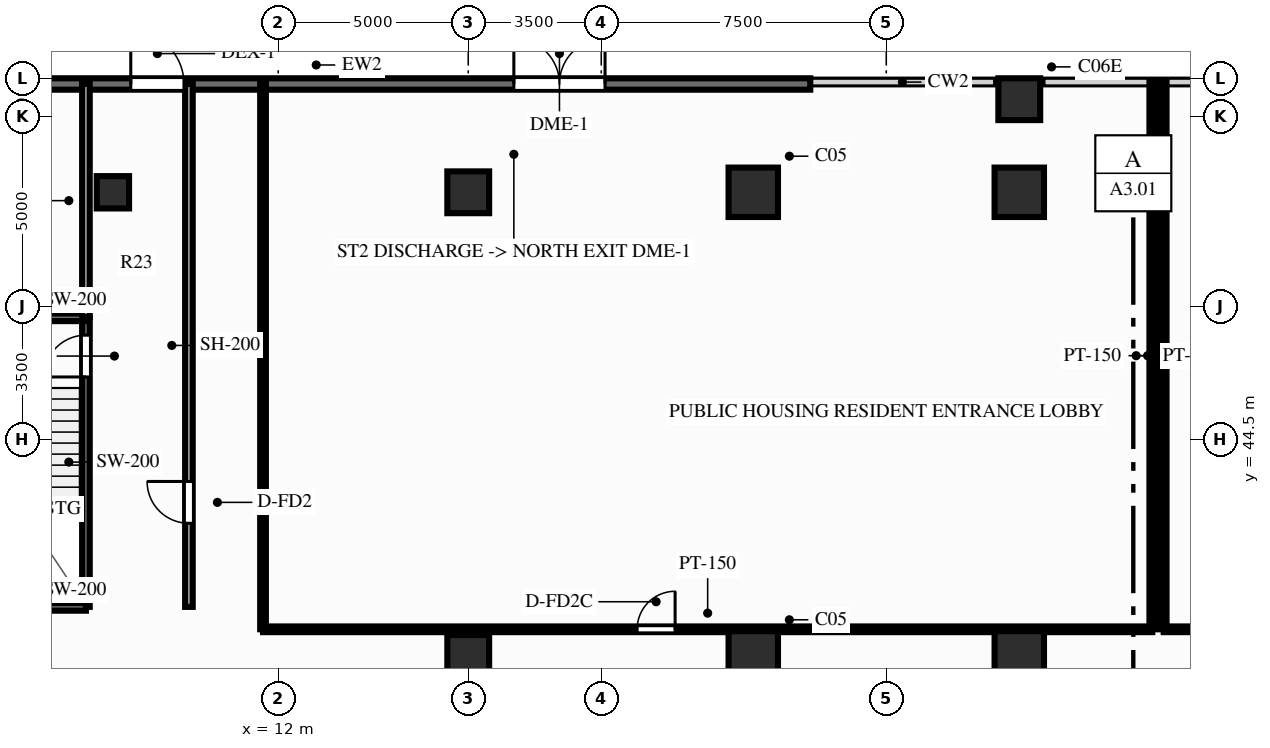
"""IFC4 building model, lengths in metres.
Left out: names, types, materials, properties, quantities, classifications, styles, units other than length and angle.
Written with IfcOpenShell. Run it as: python <this file> out.ifc"""

import sys

from ifc_helpers import new_model, si_unit, direction, frame, frame_2d, origin, origin_2d, place, context, subcontext, project, spatial, rectangle, circle, extrude, source, transform, mapped, element, fill, save


model = new_model("IFC4")
c1 = context("Model", 3, precision=1e-05, world=origin(), true_north=direction((0.0, 1.0)))
c2 = subcontext(c1, "Body", "Model", "MODEL_VIEW")
j1 = project(units=[si_unit("LENGTHUNIT", "METRE"), si_unit("PLANEANGLEUNIT", "RADIAN")], contexts=[c1])
p1 = place(None, origin())
s1 = spatial("IfcSite", under=j1, at=p1, CompositionType="ELEMENT")
p2 = place(p1, origin())
s2 = spatial("IfcBuilding", under=s1, at=p2, CompositionType="ELEMENT")
p3 = place(p2, origin())
s3 = spatial("IfcBuildingStorey", under=s2, at=p3, CompositionType="ELEMENT", Elevation=0.0)
m1 = source(origin(), c2, "Body", "SweptSolid", [
    extrude(circle(Radius=0.425, at=origin_2d()), origin(), (0.0, 0.0, 1.0), 4.2),
])
p4 = place(p3, frame((7.65, 51.0, 0.0), z_axis=(0.0, 0.0, 1.0), x_axis=(1.0, 0.0, 0.0)))
e1 = element("IfcColumn", 1, at=p4, inside=s3, PredefinedType="COLUMN", context=c2, shape_type="MappedRepresentation", body=[
    mapped(m1, transform((0.0, 0.0, 0.0), scale=1.0)),
])
m2 = source(origin(), c2, "Body", "SweptSolid", [
    extrude(rectangle(XDim=1.1, YDim=1.1, at=origin_2d()), origin(), (0.0, 0.0, 1.0), 4.2),
])
for number, where, z_axis, x_axis in (
    (2, (17.0, 38.8, 0.0), (0.0, 0.0, 1.0), (1.0, 0.0, 0.0)),
    (3, (17.0, 51.0, 0.0), (0.0, 0.0, 1.0), (1.0, 0.0, 0.0)),
):
    element("IfcColumn", number, at=place(p3, frame(where, z_axis=z_axis, x_axis=x_axis)), inside=s3, PredefinedType="COLUMN", context=c2, shape_type="MappedRepresentation", body=[
        mapped(m2, transform((0.0, 0.0, 0.0), scale=1.0)),
    ])
m3 = source(origin(), c2, "Body", "SweptSolid", [
    extrude(rectangle(XDim=1.3, YDim=1.3, at=origin_2d()), origin(), (0.0, 0.0, 1.0), 4.2),
])
for number, where, z_axis, x_axis in (
    (4, (24.5, 38.8, 0.0), (0.0, 0.0, 1.0), (1.0, 0.0, 0.0)),
    (5, (24.5, 51.0, 0.0), (0.0, 0.0, 1.0), (1.0, 0.0, 0.0)),
    (6, (31.5, 38.8, 0.0), (0.0, 0.0, 1.0), (1.0, 0.0, 0.0)),
    (7, (31.5, 51.0, 0.0), (0.0, 0.0, 1.0), (1.0, 0.0, 0.0)),
):
    element("IfcColumn", number, at=place(p3, frame(where, z_axis=z_axis, x_axis=x_axis)), inside=s3, PredefinedType="COLUMN", context=c2, shape_type="MappedRepresentation", body=[
        mapped(m3, transform((0.0, 0.0, 0.0), scale=1.0)),
    ])
p5 = place(p3, frame((31.5, 53.45, 0.0), z_axis=(0.0, 0.0, 1.0), x_axis=(1.0, 0.0, 0.0)))
e8 = element("IfcColumn", 8, at=p5, inside=s3, PredefinedType="COLUMN", context=c2, shape_type="MappedRepresentation", body=[
    mapped(m2, transform((0.0, 0.0, 0.0), scale=1.0)),
])
p6 = place(p3, frame((0.0, 53.85, 0.0), z_axis=(0.0, 0.0, 1.0), x_axis=(1.0, 0.0, 0.0)))
e9 = element("IfcWall", 9, at=p6, inside=s3, PredefinedType="SOLIDWALL", context=c2, shape_type="SweptSolid", body=[
    extrude(rectangle(XDim=26.0, YDim=0.3, at=frame_2d((13.0, 0.0))), origin(), (0.0, 0.0, 1.0), 3.48),
])
p7 = place(p6, frame((18.2, 0.0, 0.0)))
e10 = element("IfcOpeningElement", 10, at=p7, cuts=e9, PredefinedType="OPENING", context=c2, shape_type="SweptSolid", body=[
    extrude(rectangle(XDim=2.4, YDim=2.4, at=frame_2d((1.2, 1.2))), frame((0.0, 0.162, 0.0), z_axis=(0.0, -1.0, 0.0), x_axis=(1.0, 0.0, 0.0)), (0.0, 0.0, 1.0), 0.324),
])
p8 = place(p6, frame((8.12, 0.0, 0.0)))
e11 = element("IfcOpeningElement", 11, at=p8, cuts=e9, PredefinedType="OPENING", context=c2, shape_type="SweptSolid", body=[
    extrude(rectangle(XDim=1.4, YDim=2.2, at=frame_2d((0.7, 1.1))), frame((0.0, 0.162, 0.0), z_axis=(0.0, -1.0, 0.0), x_axis=(1.0, 0.0, 0.0)), (0.0, 0.0, 1.0), 0.324),
])
p9 = place(p3, frame((6.94, 40.09, 0.0), z_axis=(0.0, 0.0, 1.0), x_axis=(0.0, 1.0, 0.0)))
e12 = element("IfcWall", 12, at=p9, inside=s3, PredefinedType="SOLIDWALL", context=c2, shape_type="SweptSolid", body=[
    extrude(rectangle(XDim=7.62, YDim=0.2, at=frame_2d((3.81, 0.0))), origin(), (0.0, 0.0, 1.0), 3.92),
])
p10 = place(p9, frame((7.15, 0.0, 0.0), z_axis=(0.0, 0.0, 1.0), x_axis=(-1.0, 0.0, 0.0)))
e13 = element("IfcOpeningElement", 13, at=p10, cuts=e12, PredefinedType="OPENING", context=c2, shape_type="SweptSolid", body=[
    extrude(rectangle(XDim=1.1, YDim=2.15, at=frame_2d((0.55, 1.075))), frame((0.0, 0.112, 0.0), z_axis=(0.0, -1.0, 0.0), x_axis=(1.0, 0.0, 0.0)), (0.0, 0.0, 1.0), 0.224),
])
for number, where, z_axis, x_axis in (
    (14, (3.24, 40.09, 0.0), (0.0, 0.0, 1.0), (1.0, 0.0, 0.0)),
    (15, (3.24, 47.71, 0.0), (0.0, 0.0, 1.0), (1.0, 0.0, 0.0)),
):
    element("IfcWall", number, at=place(p3, frame(where, z_axis=z_axis, x_axis=x_axis)), inside=s3, PredefinedType="SOLIDWALL", context=c2, shape_type="SweptSolid", body=[
        extrude(rectangle(XDim=3.7, YDim=0.2, at=frame_2d((1.85, 0.0))), origin(), (0.0, 0.0, 1.0), 3.92),
    ])
p11 = place(p3, frame((6.94, 47.71, 0.0), z_axis=(0.0, 0.0, 1.0), x_axis=(0.0, 1.0, 0.0)))
e16 = element("IfcWall", 16, at=p11, inside=s3, PredefinedType="PARTITIONING", context=c2, shape_type="SweptSolid", body=[
    extrude(rectangle(XDim=6.14, YDim=0.2, at=frame_2d((3.07, 0.0))), origin(), (0.0, 0.0, 1.0), 3.92),
])
p12 = place(p3, frame((9.65, 40.09, 0.0), z_axis=(0.0, 0.0, 1.0), x_axis=(0.0, 1.0, 0.0)))
e17 = element("IfcWall", 17, at=p12, inside=s3, PredefinedType="PARTITIONING", context=c2, shape_type="SweptSolid", body=[
    extrude(rectangle(XDim=13.76, YDim=0.2, at=frame_2d((6.88, 0.0))), origin(), (0.0, 0.0, 1.0), 3.92),
])
p13 = place(p12, frame((3.3, 0.0, 0.0), z_axis=(0.0, 0.0, 1.0), x_axis=(-1.0, 0.0, 0.0)))
e18 = element("IfcOpeningElement", 18, at=p13, cuts=e17, PredefinedType="OPENING", context=c2, shape_type="SweptSolid", body=[
    extrude(rectangle(XDim=1.1, YDim=2.15, at=frame_2d((0.55, 1.075))), frame((0.0, 0.112, 0.0), z_axis=(0.0, -1.0, 0.0), x_axis=(1.0, 0.0, 0.0)), (0.0, 0.0, 1.0), 0.224),
])
p14 = place(p3, frame((11.6, 39.5, 0.0), z_axis=(0.0, 0.0, 1.0), x_axis=(1.0, 0.0, 0.0)))
e19 = element("IfcWall", 19, at=p14, inside=s3, PredefinedType="PARTITIONING", context=c2, shape_type="SweptSolid", body=[
    extrude(rectangle(XDim=23.4, YDim=0.15, at=frame_2d((11.7, 0.0))), origin(), (0.0, 0.0, 1.0), 3.92),
])
p15 = place(p14, frame((9.844, 0.0, 0.0)))
e20 = element("IfcOpeningElement", 20, at=p15, cuts=e19, PredefinedType="OPENING", context=c2, shape_type="SweptSolid", body=[
    extrude(rectangle(XDim=1.0, YDim=2.15, at=frame_2d((0.5, 1.075))), frame((0.0, 0.087, 0.0), z_axis=(0.0, -1.0, 0.0), x_axis=(1.0, 0.0, 0.0)), (0.0, 0.0, 1.0), 0.174),
])
for number, where, z_axis, x_axis in (
    (21, (11.6, 39.5, 0.0), (0.0, 0.0, 1.0), (0.0, 1.0, 0.0)),
    (22, (35.0, 39.5, 0.0), (0.0, 0.0, 1.0), (0.0, 1.0, 0.0)),
):
    element("IfcWall", number, at=place(p3, frame(where, z_axis=z_axis, x_axis=x_axis)), inside=s3, PredefinedType="PARTITIONING", context=c2, shape_type="SweptSolid", body=[
        extrude(rectangle(XDim=14.4, YDim=0.15, at=frame_2d((7.2, 0.0))), origin(), (0.0, 0.0, 1.0), 3.92),
    ])
p16 = place(p3, frame((35.3, 39.5, 0.0), z_axis=(0.0, 0.0, 1.0), x_axis=(1.0, 0.0, 0.0)))
e23 = element("IfcWall", 23, at=p16, inside=s3, PredefinedType="PARTITIONING", context=c2, shape_type="SweptSolid", body=[
    extrude(rectangle(XDim=8.8, YDim=0.15, at=frame_2d((4.4, 0.0))), origin(), (0.0, 0.0, 1.0), 3.92),
])
p17 = place(p16, frame((4.566, 0.0, 0.0)))
e24 = element("IfcOpeningElement", 24, at=p17, cuts=e23, PredefinedType="OPENING", context=c2, shape_type="SweptSolid", body=[
    extrude(rectangle(XDim=1.0, YDim=2.1, at=frame_2d((0.5, 1.05))), frame((0.0, 0.087, 0.0), z_axis=(0.0, -1.0, 0.0), x_axis=(1.0, 0.0, 0.0)), (0.0, 0.0, 1.0), 0.174),
])
p18 = place(p3, frame((35.3, 39.5, 0.0), z_axis=(0.0, 0.0, 1.0), x_axis=(0.0, 1.0, 0.0)))
e25 = element("IfcWall", 25, at=p18, inside=s3, PredefinedType="PARTITIONING", context=c2, shape_type="SweptSolid", body=[
    extrude(rectangle(XDim=14.4, YDim=0.15, at=frame_2d((7.2, 0.0))), origin(), (0.0, 0.0, 1.0), 3.92),
])
m4 = source(origin(), c2, "Body", "SweptSolid", [
    extrude(rectangle(XDim=2.4, YDim=2.4, at=frame_2d((1.2, 1.2))), frame((0.0, 0.025, 0.0), z_axis=(0.0, -1.0, 0.0), x_axis=(1.0, 0.0, 0.0)), (0.0, 0.0, 1.0), 0.05),
])
p19 = place(p7, origin())
e26 = element("IfcDoor", 26, at=p19, inside=s3, OperationType="DOUBLE_SWING_LEFT", PredefinedType="DOOR", context=c2, shape_type="MappedRepresentation", body=[
    mapped(m4, transform((0.0, 0.0, 0.0), scale=1.0)),
])
fill(e10, e26)
m5 = source(origin(), c2, "Body", "SweptSolid", [
    extrude(rectangle(XDim=1.4, YDim=2.2, at=frame_2d((0.7, 1.1))), frame((0.0, 0.025, 0.0), z_axis=(0.0, -1.0, 0.0), x_axis=(1.0, 0.0, 0.0)), (0.0, 0.0, 1.0), 0.05),
])
p20 = place(p8, origin())
e27 = element("IfcDoor", 27, at=p20, inside=s3, OperationType="SINGLE_SWING_LEFT", PredefinedType="DOOR", context=c2, shape_type="MappedRepresentation", body=[
    mapped(m5, transform((0.0, 0.0, 0.0), scale=1.0)),
])
fill(e11, e27)
m6 = source(origin(), c2, "Body", "SweptSolid", [
    extrude(rectangle(XDim=1.1, YDim=2.15, at=frame_2d((0.55, 1.075))), frame((0.0, 0.025, 0.0), z_axis=(0.0, -1.0, 0.0), x_axis=(1.0, 0.0, 0.0)), (0.0, 0.0, 1.0), 0.05),
])
p21 = place(p10, origin())
e28 = element("IfcDoor", 28, at=p21, inside=s3, OperationType="SINGLE_SWING_RIGHT", PredefinedType="DOOR", context=c2, shape_type="MappedRepresentation", body=[
    mapped(m6, transform((0.0, 0.0, 0.0), scale=1.0)),
])
fill(e13, e28)
p22 = place(p13, origin())
e29 = element("IfcDoor", 29, at=p22, inside=s3, OperationType="SINGLE_SWING_LEFT", PredefinedType="DOOR", context=c2, shape_type="MappedRepresentation", body=[
    mapped(m6, transform((0.0, 0.0, 0.0), scale=1.0)),
])
fill(e18, e29)
m7 = source(origin(), c2, "Body", "SweptSolid", [
    extrude(rectangle(XDim=1.0, YDim=2.15, at=frame_2d((0.5, 1.075))), frame((0.0, 0.025, 0.0), z_axis=(0.0, -1.0, 0.0), x_axis=(1.0, 0.0, 0.0)), (0.0, 0.0, 1.0), 0.05),
])
p23 = place(p15, origin())
e30 = element("IfcDoor", 30, at=p23, inside=s3, OperationType="SINGLE_SWING_RIGHT", PredefinedType="DOOR", context=c2, shape_type="MappedRepresentation", body=[
    mapped(m7, transform((0.0, 0.0, 0.0), scale=1.0)),
])
fill(e20, e30)
save(model, sys.argv[1])
